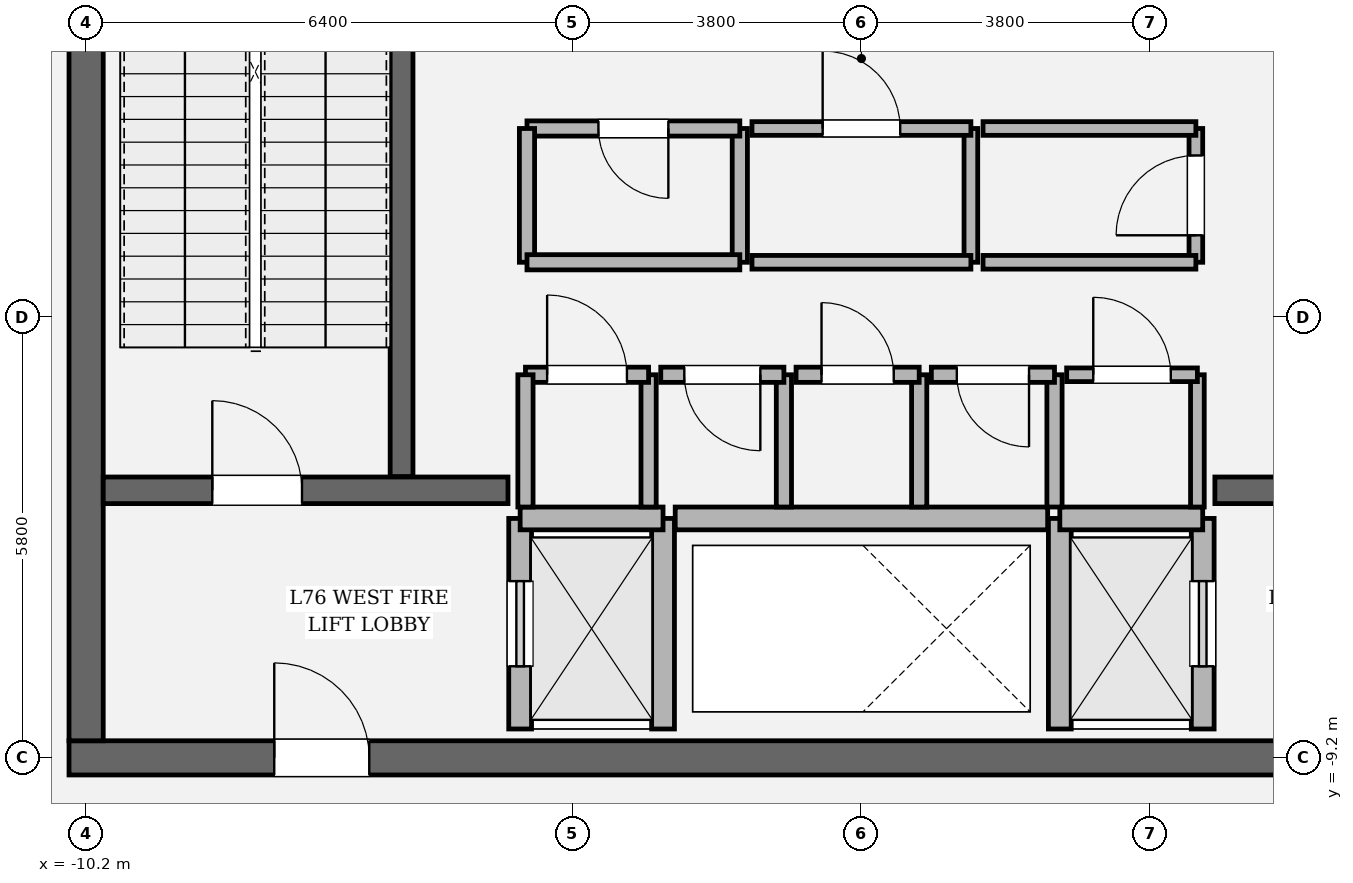
"""IFC4 building model, lengths in metres.
Left out: names, types, materials, properties, quantities, classifications, styles, units other than length and angle.
Written with IfcOpenShell. Run it as: python <this file> out.ifc"""

import sys

from ifc_helpers import new_model, si_unit, direction, frame, frame_2d, origin, place, context, subcontext, project, spatial, rectangle, extrude, element, fill, save


model = new_model("IFC4")
c1 = context("Model", 3, precision=1e-05, world=origin(), true_north=direction((0.0, 1.0)))
c2 = subcontext(c1, "Body", "Model", "MODEL_VIEW")
j1 = project(units=[si_unit("LENGTHUNIT", "METRE"), si_unit("PLANEANGLEUNIT", "RADIAN")], contexts=[c1])
p1 = place(None, origin())
s1 = spatial("IfcSite", under=j1, at=p1, CompositionType="ELEMENT")
p2 = place(p1, origin())
s2 = spatial("IfcBuilding", under=s1, at=p2, CompositionType="ELEMENT")
p3 = place(p2, frame((0.0, 0.0, 321.6)))
s3 = spatial("IfcBuildingStorey", under=s2, at=p3, CompositionType="ELEMENT", Elevation=321.6)
p4 = place(p3, frame((10.425, -9.2, 0.0), z_axis=(0.0, 0.0, 1.0), x_axis=(-1.0, 0.0, 0.0)))
e1 = element("IfcWall", 1, at=p4, inside=s3, PredefinedType="SHEAR", context=c2, shape_type="SweptSolid", body=[
    extrude(rectangle(XDim=20.85, YDim=0.45, at=frame_2d((10.425, 0.0))), origin(), (0.0, 0.0, 1.0), 4.2),
])
p5 = place(p4, frame((2.7, 0.0, 0.0)))
e2 = element("IfcOpeningElement", 2, at=p5, cuts=e1, PredefinedType="OPENING", context=c2, shape_type="SweptSolid", body=[
    extrude(rectangle(XDim=1.25, YDim=2.25, at=frame_2d((0.625, 1.125))), frame((0.0, 0.235, 0.0), z_axis=(0.0, -1.0, 0.0), x_axis=(1.0, 0.0, 0.0)), (0.0, 0.0, 1.0), 0.47),
])
p6 = place(p4, frame((16.9, 0.0, 0.0)))
e3 = element("IfcOpeningElement", 3, at=p6, cuts=e1, PredefinedType="OPENING", context=c2, shape_type="SweptSolid", body=[
    extrude(rectangle(XDim=1.25, YDim=2.25, at=frame_2d((0.625, 1.125))), frame((0.0, 0.235, 0.0), z_axis=(0.0, -1.0, 0.0), x_axis=(1.0, 0.0, 0.0)), (0.0, 0.0, 1.0), 0.47),
])
p7 = place(p3, frame((-10.2, -8.975, 0.0), z_axis=(0.0, 0.0, 1.0), x_axis=(0.0, 1.0, 0.0)))
e4 = element("IfcWall", 4, at=p7, inside=s3, PredefinedType="SHEAR", context=c2, shape_type="SweptSolid", body=[
    extrude(rectangle(XDim=17.95, YDim=0.45, at=frame_2d((8.975, 0.0))), origin(), (0.0, 0.0, 1.0), 4.2),
])
p8 = place(p7, frame((12.765, 0.0, 0.0)))
e5 = element("IfcOpeningElement", 5, at=p8, cuts=e4, PredefinedType="OPENING", context=c2, shape_type="SweptSolid", body=[
    extrude(rectangle(XDim=1.18, YDim=2.2, at=frame_2d((0.59, 1.1))), frame((0.0, 0.235, 0.0), z_axis=(0.0, -1.0, 0.0), x_axis=(1.0, 0.0, 0.0)), (0.0, 0.0, 1.0), 0.47),
])
p9 = place(p3, frame((-6.05, -5.5, 0.0), z_axis=(0.0, 0.0, 1.0), x_axis=(0.0, 1.0, 0.0)))
e6 = element("IfcWall", 6, at=p9, inside=s3, PredefinedType="SOLIDWALL", context=c2, shape_type="SweptSolid", body=[
    extrude(rectangle(XDim=8.95, YDim=0.3, at=frame_2d((4.475, 0.0))), origin(), (0.0, 0.0, 1.0), 4.2),
])
p10 = place(p3, frame((-9.975, -5.68, 0.0), z_axis=(0.0, 0.0, 1.0), x_axis=(1.0, 0.0, 0.0)))
e7 = element("IfcWall", 7, at=p10, inside=s3, PredefinedType="SOLIDWALL", context=c2, shape_type="SweptSolid", body=[
    extrude(rectangle(XDim=5.325, YDim=0.35, at=frame_2d((2.663, 0.0))), origin(), (0.0, 0.0, 1.0), 4.2),
])
p11 = place(p10, frame((1.435, 0.0, 0.0)))
e8 = element("IfcOpeningElement", 8, at=p11, cuts=e7, PredefinedType="OPENING", context=c2, shape_type="SweptSolid", body=[
    extrude(rectangle(XDim=1.18, YDim=2.2, at=frame_2d((0.59, 1.1))), frame((0.0, 0.185, 0.0), z_axis=(0.0, -1.0, 0.0), x_axis=(1.0, 0.0, 0.0)), (0.0, 0.0, 1.0), 0.37),
])
p12 = place(p3, frame((4.65, -5.68, 0.0), z_axis=(0.0, 0.0, 1.0), x_axis=(1.0, 0.0, 0.0)))
e9 = element("IfcWall", 9, at=p12, inside=s3, PredefinedType="SOLIDWALL", context=c2, shape_type="SweptSolid", body=[
    extrude(rectangle(XDim=5.325, YDim=0.35, at=frame_2d((2.663, 0.0))), origin(), (0.0, 0.0, 1.0), 4.2),
])
p13 = place(p12, frame((2.71, 0.0, 0.0)))
e10 = element("IfcOpeningElement", 10, at=p13, cuts=e9, PredefinedType="OPENING", context=c2, shape_type="SweptSolid", body=[
    extrude(rectangle(XDim=1.18, YDim=2.2, at=frame_2d((0.59, 1.1))), frame((0.0, 0.185, 0.0), z_axis=(0.0, -1.0, 0.0), x_axis=(1.0, 0.0, 0.0)), (0.0, 0.0, 1.0), 0.37),
])
p14 = place(p3, frame((-4.49, -8.82, 0.0), z_axis=(0.0, 0.0, 1.0), x_axis=(0.0, 1.0, 0.0)))
e11 = element("IfcWall", 11, at=p14, inside=s3, PredefinedType="SOLIDWALL", context=c2, shape_type="SweptSolid", body=[
    extrude(rectangle(XDim=2.77, YDim=0.3, at=frame_2d((1.385, 0.0))), origin(), (0.0, 0.0, 1.0), 4.0),
])
p15 = place(p14, frame((0.825, 0.0, 0.0)))
e12 = element("IfcOpeningElement", 12, at=p15, cuts=e11, PredefinedType="OPENING", context=c2, shape_type="SweptSolid", body=[
    extrude(rectangle(XDim=1.12, YDim=2.25, at=frame_2d((0.56, 1.125))), frame((0.0, 0.16, 0.0), z_axis=(0.0, -1.0, 0.0), x_axis=(1.0, 0.0, 0.0)), (0.0, 0.0, 1.0), 0.32),
])
p16 = place(p3, frame((-2.61, -8.82, 0.0), z_axis=(0.0, 0.0, 1.0), x_axis=(0.0, 1.0, 0.0)))
e13 = element("IfcWall", 13, at=p16, inside=s3, PredefinedType="SOLIDWALL", context=c2, shape_type="SweptSolid", body=[
    extrude(rectangle(XDim=2.77, YDim=0.3, at=frame_2d((1.385, 0.0))), origin(), (0.0, 0.0, 1.0), 4.0),
])
p17 = place(p3, frame((-4.49, -6.05, 0.0), z_axis=(0.0, 0.0, 1.0), x_axis=(1.0, 0.0, 0.0)))
e14 = element("IfcWall", 14, at=p17, inside=s3, PredefinedType="SOLIDWALL", context=c2, shape_type="SweptSolid", body=[
    extrude(rectangle(XDim=1.88, YDim=0.3, at=frame_2d((0.94, 0.0))), origin(), (0.0, 0.0, 1.0), 4.0),
])
p18 = place(p3, frame((4.49, -8.82, 0.0), z_axis=(0.0, 0.0, 1.0), x_axis=(0.0, 1.0, 0.0)))
e15 = element("IfcWall", 15, at=p18, inside=s3, PredefinedType="SOLIDWALL", context=c2, shape_type="SweptSolid", body=[
    extrude(rectangle(XDim=2.77, YDim=0.3, at=frame_2d((1.385, 0.0))), origin(), (0.0, 0.0, 1.0), 4.0),
])
p19 = place(p18, frame((0.825, 0.0, 0.0)))
e16 = element("IfcOpeningElement", 16, at=p19, cuts=e15, PredefinedType="OPENING", context=c2, shape_type="SweptSolid", body=[
    extrude(rectangle(XDim=1.12, YDim=2.25, at=frame_2d((0.56, 1.125))), frame((0.0, 0.16, 0.0), z_axis=(0.0, -1.0, 0.0), x_axis=(1.0, 0.0, 0.0)), (0.0, 0.0, 1.0), 0.32),
])
p20 = place(p3, frame((2.61, -8.82, 0.0), z_axis=(0.0, 0.0, 1.0), x_axis=(0.0, 1.0, 0.0)))
e17 = element("IfcWall", 17, at=p20, inside=s3, PredefinedType="SOLIDWALL", context=c2, shape_type="SweptSolid", body=[
    extrude(rectangle(XDim=2.77, YDim=0.3, at=frame_2d((1.385, 0.0))), origin(), (0.0, 0.0, 1.0), 4.0),
])
p21 = place(p3, frame((2.61, -6.05, 0.0), z_axis=(0.0, 0.0, 1.0), x_axis=(1.0, 0.0, 0.0)))
e18 = element("IfcWall", 18, at=p21, inside=s3, PredefinedType="SOLIDWALL", context=c2, shape_type="SweptSolid", body=[
    extrude(rectangle(XDim=1.88, YDim=0.3, at=frame_2d((0.94, 0.0))), origin(), (0.0, 0.0, 1.0), 4.0),
])
p22 = place(p3, frame((-2.45, -6.05, 0.0), z_axis=(0.0, 0.0, 1.0), x_axis=(1.0, 0.0, 0.0)))
e19 = element("IfcWall", 19, at=p22, inside=s3, PredefinedType="SOLIDWALL", context=c2, shape_type="SweptSolid", body=[
    extrude(rectangle(XDim=4.9, YDim=0.3, at=frame_2d((2.45, 0.0))), origin(), (0.0, 0.0, 1.0), 4.0),
])
p23 = place(p3, frame((-2.8, -5.9, 0.0), z_axis=(0.0, 0.0, 1.0), x_axis=(0.0, 1.0, 0.0)))
e20 = element("IfcWall", 20, at=p23, inside=s3, PredefinedType="SOLIDWALL", context=c2, shape_type="SweptSolid", body=[
    extrude(rectangle(XDim=1.74, YDim=0.2, at=frame_2d((0.87, 0.0))), origin(), (0.0, 0.0, 1.0), 4.0),
])
p24 = place(p3, frame((-2.8, -4.16, 0.0), z_axis=(0.0, 0.0, 1.0), x_axis=(-1.0, 0.0, 0.0)))
e21 = element("IfcWall", 21, at=p24, inside=s3, PredefinedType="SOLIDWALL", context=c2, shape_type="SweptSolid", body=[
    extrude(rectangle(XDim=1.62, YDim=0.2, at=frame_2d((0.81, 0.0))), origin(), (0.0, 0.0, 1.0), 4.0),
])
p25 = place(p24, frame((0.285, 0.0, 0.0)))
e22 = element("IfcOpeningElement", 22, at=p25, cuts=e21, PredefinedType="OPENING", context=c2, shape_type="SweptSolid", body=[
    extrude(rectangle(XDim=1.05, YDim=2.2, at=frame_2d((0.525, 1.1))), frame((0.0, 0.11, 0.0), z_axis=(0.0, -1.0, 0.0), x_axis=(1.0, 0.0, 0.0)), (0.0, 0.0, 1.0), 0.22),
])
for number, where, z_axis, x_axis in (
    (23, (-4.42, -4.16, 0.0), (0.0, 0.0, 1.0), (0.0, -1.0, 0.0)),
    (24, (-1.02, -5.9, 0.0), (0.0, 0.0, 1.0), (0.0, 1.0, 0.0)),
):
    element("IfcWall", number, at=place(p3, frame(where, z_axis=z_axis, x_axis=x_axis)), inside=s3, PredefinedType="SOLIDWALL", context=c2, shape_type="SweptSolid", body=[
        extrude(rectangle(XDim=1.74, YDim=0.2, at=frame_2d((0.87, 0.0))), origin(), (0.0, 0.0, 1.0), 4.0),
    ])
p26 = place(p3, frame((-1.02, -4.16, 0.0), z_axis=(0.0, 0.0, 1.0), x_axis=(-1.0, 0.0, 0.0)))
e25 = element("IfcWall", 25, at=p26, inside=s3, PredefinedType="SOLIDWALL", context=c2, shape_type="SweptSolid", body=[
    extrude(rectangle(XDim=1.62, YDim=0.2, at=frame_2d((0.81, 0.0))), origin(), (0.0, 0.0, 1.0), 4.0),
])
p27 = place(p26, frame((0.31, 0.0, 0.0)))
e26 = element("IfcOpeningElement", 26, at=p27, cuts=e25, PredefinedType="OPENING", context=c2, shape_type="SweptSolid", body=[
    extrude(rectangle(XDim=1.0, YDim=2.15, at=frame_2d((0.5, 1.075))), frame((0.0, 0.11, 0.0), z_axis=(0.0, -1.0, 0.0), x_axis=(1.0, 0.0, 0.0)), (0.0, 0.0, 1.0), 0.22),
])
p28 = place(p3, frame((0.76, -5.9, 0.0), z_axis=(0.0, 0.0, 1.0), x_axis=(0.0, 1.0, 0.0)))
e27 = element("IfcWall", 27, at=p28, inside=s3, PredefinedType="SOLIDWALL", context=c2, shape_type="SweptSolid", body=[
    extrude(rectangle(XDim=1.74, YDim=0.2, at=frame_2d((0.87, 0.0))), origin(), (0.0, 0.0, 1.0), 4.0),
])
p29 = place(p3, frame((0.76, -4.16, 0.0), z_axis=(0.0, 0.0, 1.0), x_axis=(-1.0, 0.0, 0.0)))
e28 = element("IfcWall", 28, at=p29, inside=s3, PredefinedType="SOLIDWALL", context=c2, shape_type="SweptSolid", body=[
    extrude(rectangle(XDim=1.62, YDim=0.2, at=frame_2d((0.81, 0.0))), origin(), (0.0, 0.0, 1.0), 4.0),
])
p30 = place(p29, frame((0.335, 0.0, 0.0)))
e29 = element("IfcOpeningElement", 29, at=p30, cuts=e28, PredefinedType="OPENING", context=c2, shape_type="SweptSolid", body=[
    extrude(rectangle(XDim=0.95, YDim=2.15, at=frame_2d((0.475, 1.075))), frame((0.0, 0.11, 0.0), z_axis=(0.0, -1.0, 0.0), x_axis=(1.0, 0.0, 0.0)), (0.0, 0.0, 1.0), 0.22),
])
p31 = place(p3, frame((2.54, -5.9, 0.0), z_axis=(0.0, 0.0, 1.0), x_axis=(0.0, 1.0, 0.0)))
e30 = element("IfcWall", 30, at=p31, inside=s3, PredefinedType="SOLIDWALL", context=c2, shape_type="SweptSolid", body=[
    extrude(rectangle(XDim=1.74, YDim=0.2, at=frame_2d((0.87, 0.0))), origin(), (0.0, 0.0, 1.0), 4.0),
])
p32 = place(p3, frame((2.54, -4.16, 0.0), z_axis=(0.0, 0.0, 1.0), x_axis=(-1.0, 0.0, 0.0)))
e31 = element("IfcWall", 31, at=p32, inside=s3, PredefinedType="SOLIDWALL", context=c2, shape_type="SweptSolid", body=[
    extrude(rectangle(XDim=1.62, YDim=0.2, at=frame_2d((0.81, 0.0))), origin(), (0.0, 0.0, 1.0), 4.0),
])
p33 = place(p32, frame((0.335, 0.0, 0.0)))
e32 = element("IfcOpeningElement", 32, at=p33, cuts=e31, PredefinedType="OPENING", context=c2, shape_type="SweptSolid", body=[
    extrude(rectangle(XDim=0.95, YDim=2.15, at=frame_2d((0.475, 1.075))), frame((0.0, 0.11, 0.0), z_axis=(0.0, -1.0, 0.0), x_axis=(1.0, 0.0, 0.0)), (0.0, 0.0, 1.0), 0.22),
])
p34 = place(p3, frame((4.42, -5.9, 0.0), z_axis=(0.0, 0.0, 1.0), x_axis=(0.0, 1.0, 0.0)))
e33 = element("IfcWall", 33, at=p34, inside=s3, PredefinedType="PARTITIONING", context=c2, shape_type="SweptSolid", body=[
    extrude(rectangle(XDim=1.74, YDim=0.18, at=frame_2d((0.87, 0.0))), origin(), (0.0, 0.0, 1.0), 4.0),
])
p35 = place(p3, frame((4.42, -4.16, 0.0), z_axis=(0.0, 0.0, 1.0), x_axis=(-1.0, 0.0, 0.0)))
e34 = element("IfcWall", 34, at=p35, inside=s3, PredefinedType="PARTITIONING", context=c2, shape_type="SweptSolid", body=[
    extrude(rectangle(XDim=1.72, YDim=0.18, at=frame_2d((0.86, 0.0))), origin(), (0.0, 0.0, 1.0), 4.0),
])
p36 = place(p35, frame((0.35, 0.0, 0.0)))
e35 = element("IfcOpeningElement", 35, at=p36, cuts=e34, PredefinedType="OPENING", context=c2, shape_type="SweptSolid", body=[
    extrude(rectangle(XDim=1.02, YDim=2.2, at=frame_2d((0.51, 1.1))), frame((0.0, 0.1, 0.0), z_axis=(0.0, -1.0, 0.0), x_axis=(1.0, 0.0, 0.0)), (0.0, 0.0, 1.0), 0.2),
])
p37 = place(p3, frame((-1.6, -2.68, 0.0), z_axis=(0.0, 0.0, 1.0), x_axis=(0.0, 1.0, 0.0)))
e36 = element("IfcWall", 36, at=p37, inside=s3, PredefinedType="SOLIDWALL", context=c2, shape_type="SweptSolid", body=[
    extrude(rectangle(XDim=1.76, YDim=0.2, at=frame_2d((0.88, 0.0))), origin(), (0.0, 0.0, 1.0), 4.0),
])
p38 = place(p3, frame((-1.6, -0.92, 0.0), z_axis=(0.0, 0.0, 1.0), x_axis=(-1.0, 0.0, 0.0)))
e37 = element("IfcWall", 37, at=p38, inside=s3, PredefinedType="SOLIDWALL", context=c2, shape_type="SweptSolid", body=[
    extrude(rectangle(XDim=2.8, YDim=0.2, at=frame_2d((1.4, 0.0))), origin(), (0.0, 0.0, 1.0), 4.0),
])
p39 = place(p38, frame((0.94, 0.0, 0.0)))
e38 = element("IfcOpeningElement", 38, at=p39, cuts=e37, PredefinedType="OPENING", context=c2, shape_type="SweptSolid", body=[
    extrude(rectangle(XDim=0.92, YDim=2.1, at=frame_2d((0.46, 1.05))), frame((0.0, 0.11, 0.0), z_axis=(0.0, -1.0, 0.0), x_axis=(1.0, 0.0, 0.0)), (0.0, 0.0, 1.0), 0.22),
])
p40 = place(p3, frame((-4.4, -0.92, 0.0), z_axis=(0.0, 0.0, 1.0), x_axis=(0.0, -1.0, 0.0)))
e39 = element("IfcWall", 39, at=p40, inside=s3, PredefinedType="SOLIDWALL", context=c2, shape_type="SweptSolid", body=[
    extrude(rectangle(XDim=1.76, YDim=0.2, at=frame_2d((0.88, 0.0))), origin(), (0.0, 0.0, 1.0), 4.0),
])
p41 = place(p3, frame((-4.4, -2.68, 0.0), z_axis=(0.0, 0.0, 1.0), x_axis=(1.0, 0.0, 0.0)))
e40 = element("IfcWall", 40, at=p41, inside=s3, PredefinedType="SOLIDWALL", context=c2, shape_type="SweptSolid", body=[
    extrude(rectangle(XDim=2.8, YDim=0.2, at=frame_2d((1.4, 0.0))), origin(), (0.0, 0.0, 1.0), 4.0),
])
p42 = place(p3, frame((1.44, -2.68, 0.0), z_axis=(0.0, 0.0, 1.0), x_axis=(0.0, 1.0, 0.0)))
e41 = element("IfcWall", 41, at=p42, inside=s3, PredefinedType="PARTITIONING", context=c2, shape_type="SweptSolid", body=[
    extrude(rectangle(XDim=1.76, YDim=0.18, at=frame_2d((0.88, 0.0))), origin(), (0.0, 0.0, 1.0), 4.0),
])
p43 = place(p3, frame((1.44, -0.92, 0.0), z_axis=(0.0, 0.0, 1.0), x_axis=(-1.0, 0.0, 0.0)))
e42 = element("IfcWall", 42, at=p43, inside=s3, PredefinedType="PARTITIONING", context=c2, shape_type="SweptSolid", body=[
    extrude(rectangle(XDim=2.88, YDim=0.18, at=frame_2d((1.44, 0.0))), origin(), (0.0, 0.0, 1.0), 4.0),
])
p44 = place(p43, frame((0.93, 0.0, 0.0)))
e43 = element("IfcOpeningElement", 43, at=p44, cuts=e42, PredefinedType="OPENING", context=c2, shape_type="SweptSolid", body=[
    extrude(rectangle(XDim=1.02, YDim=2.2, at=frame_2d((0.51, 1.1))), frame((0.0, 0.1, 0.0), z_axis=(0.0, -1.0, 0.0), x_axis=(1.0, 0.0, 0.0)), (0.0, 0.0, 1.0), 0.2),
])
p45 = place(p3, frame((-1.44, -2.68, 0.0), z_axis=(0.0, 0.0, 1.0), x_axis=(1.0, 0.0, 0.0)))
e44 = element("IfcWall", 44, at=p45, inside=s3, PredefinedType="PARTITIONING", context=c2, shape_type="SweptSolid", body=[
    extrude(rectangle(XDim=2.88, YDim=0.18, at=frame_2d((1.44, 0.0))), origin(), (0.0, 0.0, 1.0), 4.0),
])
p46 = place(p3, frame((4.4, -2.68, 0.0), z_axis=(0.0, 0.0, 1.0), x_axis=(0.0, 1.0, 0.0)))
e45 = element("IfcWall", 45, at=p46, inside=s3, PredefinedType="PARTITIONING", context=c2, shape_type="SweptSolid", body=[
    extrude(rectangle(XDim=1.76, YDim=0.18, at=frame_2d((0.88, 0.0))), origin(), (0.0, 0.0, 1.0), 4.0),
])
p47 = place(p46, frame((0.355, 0.0, 0.0)))
e46 = element("IfcOpeningElement", 46, at=p47, cuts=e45, PredefinedType="OPENING", context=c2, shape_type="SweptSolid", body=[
    extrude(rectangle(XDim=1.05, YDim=2.2, at=frame_2d((0.525, 1.1))), frame((0.0, 0.1, 0.0), z_axis=(0.0, -1.0, 0.0), x_axis=(1.0, 0.0, 0.0)), (0.0, 0.0, 1.0), 0.2),
])
for number, where, z_axis, x_axis in (
    (47, (4.4, -0.92, 0.0), (0.0, 0.0, 1.0), (-1.0, 0.0, 0.0)),
    (48, (1.6, -2.68, 0.0), (0.0, 0.0, 1.0), (1.0, 0.0, 0.0)),
):
    element("IfcWall", number, at=place(p3, frame(where, z_axis=z_axis, x_axis=x_axis)), inside=s3, PredefinedType="PARTITIONING", context=c2, shape_type="SweptSolid", body=[
        extrude(rectangle(XDim=2.8, YDim=0.18, at=frame_2d((1.4, 0.0))), origin(), (0.0, 0.0, 1.0), 4.0),
    ])
p48 = place(p11, origin())
e49 = element("IfcDoor", 49, at=p48, inside=s3, OperationType="SINGLE_SWING_LEFT", PredefinedType="DOOR", context=c2, shape_type="SweptSolid", body=[
    extrude(rectangle(XDim=1.18, YDim=2.2, at=frame_2d((0.59, 1.1))), frame((0.0, 0.025, 0.0), z_axis=(0.0, -1.0, 0.0), x_axis=(1.0, 0.0, 0.0)), (0.0, 0.0, 1.0), 0.05),
])
fill(e8, e49)
p49 = place(p6, origin())
e50 = element("IfcDoor", 50, at=p49, inside=s3, OperationType="SINGLE_SWING_RIGHT", PredefinedType="DOOR", context=c2, shape_type="SweptSolid", body=[
    extrude(rectangle(XDim=1.25, YDim=2.25, at=frame_2d((0.625, 1.125))), frame((0.0, 0.025, 0.0), z_axis=(0.0, -1.0, 0.0), x_axis=(1.0, 0.0, 0.0)), (0.0, 0.0, 1.0), 0.05),
])
fill(e3, e50)
p50 = place(p15, origin())
e51 = element("IfcDoor", 51, at=p50, inside=s3, OperationType="SLIDING_TO_LEFT", PredefinedType="DOOR", context=c2, shape_type="SweptSolid", body=[
    extrude(rectangle(XDim=1.12, YDim=2.25, at=frame_2d((0.56, 1.125))), frame((0.0, 0.025, 0.0), z_axis=(0.0, -1.0, 0.0), x_axis=(1.0, 0.0, 0.0)), (0.0, 0.0, 1.0), 0.05),
])
fill(e12, e51)
p51 = place(p19, origin())
e52 = element("IfcDoor", 52, at=p51, inside=s3, OperationType="SLIDING_TO_RIGHT", PredefinedType="DOOR", context=c2, shape_type="SweptSolid", body=[
    extrude(rectangle(XDim=1.12, YDim=2.25, at=frame_2d((0.56, 1.125))), frame((0.0, 0.025, 0.0), z_axis=(0.0, -1.0, 0.0), x_axis=(1.0, 0.0, 0.0)), (0.0, 0.0, 1.0), 0.05),
])
fill(e16, e52)
p52 = place(p25, origin())
e53 = element("IfcDoor", 53, at=p52, inside=s3, OperationType="SINGLE_SWING_RIGHT", PredefinedType="DOOR", context=c2, shape_type="SweptSolid", body=[
    extrude(rectangle(XDim=1.05, YDim=2.2, at=frame_2d((0.525, 1.1))), frame((0.0, 0.025, 0.0), z_axis=(0.0, -1.0, 0.0), x_axis=(1.0, 0.0, 0.0)), (0.0, 0.0, 1.0), 0.05),
])
fill(e22, e53)
p53 = place(p27, origin())
e54 = element("IfcDoor", 54, at=p53, inside=s3, OperationType="SINGLE_SWING_LEFT", PredefinedType="DOOR", context=c2, shape_type="SweptSolid", body=[
    extrude(rectangle(XDim=1.0, YDim=2.15, at=frame_2d((0.5, 1.075))), frame((0.0, 0.025, 0.0), z_axis=(0.0, -1.0, 0.0), x_axis=(1.0, 0.0, 0.0)), (0.0, 0.0, 1.0), 0.05),
])
fill(e26, e54)
p54 = place(p30, origin())
e55 = element("IfcDoor", 55, at=p54, inside=s3, OperationType="SINGLE_SWING_RIGHT", PredefinedType="DOOR", context=c2, shape_type="SweptSolid", body=[
    extrude(rectangle(XDim=0.95, YDim=2.15, at=frame_2d((0.475, 1.075))), frame((0.0, 0.025, 0.0), z_axis=(0.0, -1.0, 0.0), x_axis=(1.0, 0.0, 0.0)), (0.0, 0.0, 1.0), 0.05),
])
fill(e29, e55)
p55 = place(p33, origin())
e56 = element("IfcDoor", 56, at=p55, inside=s3, OperationType="SINGLE_SWING_LEFT", PredefinedType="DOOR", context=c2, shape_type="SweptSolid", body=[
    extrude(rectangle(XDim=0.95, YDim=2.15, at=frame_2d((0.475, 1.075))), frame((0.0, 0.025, 0.0), z_axis=(0.0, -1.0, 0.0), x_axis=(1.0, 0.0, 0.0)), (0.0, 0.0, 1.0), 0.05),
])
fill(e32, e56)
p56 = place(p36, origin())
e57 = element("IfcDoor", 57, at=p56, inside=s3, OperationType="SINGLE_SWING_RIGHT", PredefinedType="DOOR", context=c2, shape_type="SweptSolid", body=[
    extrude(rectangle(XDim=1.02, YDim=2.2, at=frame_2d((0.51, 1.1))), frame((0.0, 0.025, 0.0), z_axis=(0.0, -1.0, 0.0), x_axis=(1.0, 0.0, 0.0)), (0.0, 0.0, 1.0), 0.05),
])
fill(e35, e57)
p57 = place(p39, origin())
e58 = element("IfcDoor", 58, at=p57, inside=s3, OperationType="SINGLE_SWING_LEFT", PredefinedType="DOOR", context=c2, shape_type="SweptSolid", body=[
    extrude(rectangle(XDim=0.92, YDim=2.1, at=frame_2d((0.46, 1.05))), frame((0.0, 0.025, 0.0), z_axis=(0.0, -1.0, 0.0), x_axis=(1.0, 0.0, 0.0)), (0.0, 0.0, 1.0), 0.05),
])
fill(e38, e58)
p58 = place(p44, origin())
e59 = element("IfcDoor", 59, at=p58, inside=s3, OperationType="SINGLE_SWING_RIGHT", PredefinedType="DOOR", context=c2, shape_type="SweptSolid", body=[
    extrude(rectangle(XDim=1.02, YDim=2.2, at=frame_2d((0.51, 1.1))), frame((0.0, 0.025, 0.0), z_axis=(0.0, -1.0, 0.0), x_axis=(1.0, 0.0, 0.0)), (0.0, 0.0, 1.0), 0.05),
])
fill(e43, e59)
p59 = place(p47, origin())
e60 = element("IfcDoor", 60, at=p59, inside=s3, OperationType="SINGLE_SWING_LEFT", PredefinedType="DOOR", context=c2, shape_type="SweptSolid", body=[
    extrude(rectangle(XDim=1.05, YDim=2.2, at=frame_2d((0.525, 1.1))), frame((0.0, 0.025, 0.0), z_axis=(0.0, -1.0, 0.0), x_axis=(1.0, 0.0, 0.0)), (0.0, 0.0, 1.0), 0.05),
])
fill(e46, e60)
save(model, sys.argv[1])
